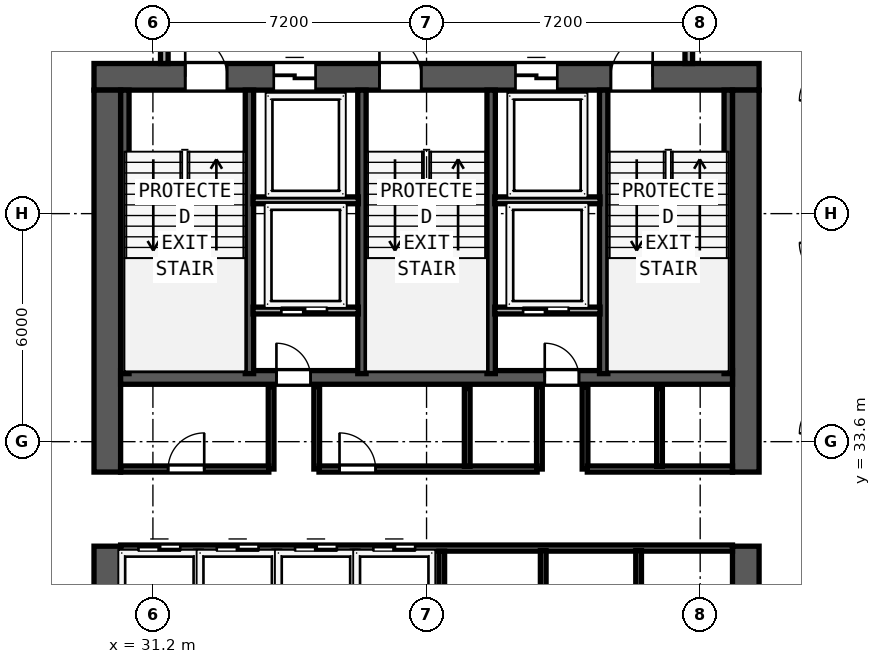
"""IFC4 building model, lengths in metres.
Left out: names, types, materials, properties, quantities, classifications, styles, units other than length and angle.
Written with IfcOpenShell. Run it as: python <this file> out.ifc"""

import sys

from ifc_helpers import new_model, si_unit, direction, frame, frame_2d, origin, place, context, subcontext, project, spatial, rectangle, extrude, element, fill, save


model = new_model("IFC4")
c1 = context("Model", 3, precision=1e-05, world=origin(), true_north=direction((0.0, 1.0)))
c2 = subcontext(c1, "Body", "Model", "MODEL_VIEW")
j1 = project(units=[si_unit("LENGTHUNIT", "METRE"), si_unit("PLANEANGLEUNIT", "RADIAN")], contexts=[c1])
p1 = place(None, origin())
s1 = spatial("IfcSite", under=j1, at=p1, CompositionType="ELEMENT")
p2 = place(p1, origin())
s2 = spatial("IfcBuilding", under=s1, at=p2, CompositionType="ELEMENT")
p3 = place(p2, frame((0.0, 0.0, 152.4)))
s3 = spatial("IfcBuildingStorey", under=s2, at=p3, CompositionType="ELEMENT", Elevation=152.4)
p4 = place(p3, frame((29.65, 43.2, 0.0), z_axis=(0.0, 0.0, 1.0), x_axis=(1.0, 0.0, 0.0)))
e1 = element("IfcWall", 1, at=p4, inside=s3, PredefinedType="SHEAR", context=c2, shape_type="SweptSolid", body=[
    extrude(rectangle(XDim=17.5, YDim=0.7, at=frame_2d((8.75, 0.0))), origin(), (0.0, 0.0, 1.0), 3.6),
])
p5 = place(p4, frame((2.4, 0.0, 0.0)))
e2 = element("IfcOpeningElement", 2, at=p5, cuts=e1, PredefinedType="OPENING", context=c2, shape_type="SweptSolid", body=[
    extrude(rectangle(XDim=1.1, YDim=2.15, at=frame_2d((0.55, 1.075))), frame((0.0, 0.36, 0.0), z_axis=(0.0, -1.0, 0.0), x_axis=(1.0, 0.0, 0.0)), (0.0, 0.0, 1.0), 0.72),
])
p6 = place(p4, frame((7.51, 0.0, 0.0)))
e3 = element("IfcOpeningElement", 3, at=p6, cuts=e1, PredefinedType="OPENING", context=c2, shape_type="SweptSolid", body=[
    extrude(rectangle(XDim=1.1, YDim=2.15, at=frame_2d((0.55, 1.075))), frame((0.0, 0.36, 0.0), z_axis=(0.0, -1.0, 0.0), x_axis=(1.0, 0.0, 0.0)), (0.0, 0.0, 1.0), 0.72),
])
p7 = place(p4, frame((13.6, 0.0, 0.0)))
e4 = element("IfcOpeningElement", 4, at=p7, cuts=e1, PredefinedType="OPENING", context=c2, shape_type="SweptSolid", body=[
    extrude(rectangle(XDim=1.1, YDim=2.15, at=frame_2d((0.55, 1.075))), frame((0.0, 0.36, 0.0), z_axis=(0.0, -1.0, 0.0), x_axis=(1.0, 0.0, 0.0)), (0.0, 0.0, 1.0), 0.72),
])
p8 = place(p4, frame((4.73, 0.0, 0.0)))
e5 = element("IfcOpeningElement", 5, at=p8, cuts=e1, PredefinedType="OPENING", context=c2, shape_type="SweptSolid", body=[
    extrude(rectangle(XDim=1.1, YDim=2.2, at=frame_2d((0.55, 1.1))), frame((0.0, 0.36, 0.0), z_axis=(0.0, -1.0, 0.0), x_axis=(1.0, 0.0, 0.0)), (0.0, 0.0, 1.0), 0.72),
])
p9 = place(p4, frame((11.09, 0.0, 0.0)))
e6 = element("IfcOpeningElement", 6, at=p9, cuts=e1, PredefinedType="OPENING", context=c2, shape_type="SweptSolid", body=[
    extrude(rectangle(XDim=1.1, YDim=2.2, at=frame_2d((0.55, 1.1))), frame((0.0, 0.36, 0.0), z_axis=(0.0, -1.0, 0.0), x_axis=(1.0, 0.0, 0.0)), (0.0, 0.0, 1.0), 0.72),
])
p10 = place(p3, frame((30.0, 26.75, 0.0), z_axis=(0.0, 0.0, 1.0), x_axis=(0.0, 1.0, 0.0)))
e7 = element("IfcWall", 7, at=p10, inside=s3, PredefinedType="SHEAR", context=c2, shape_type="SweptSolid", body=[
    extrude(rectangle(XDim=4.1, YDim=0.7, at=frame_2d((2.05, 0.0))), origin(), (0.0, 0.0, 1.0), 3.6),
])
p11 = place(p3, frame((30.0, 32.8, 0.0), z_axis=(0.0, 0.0, 1.0), x_axis=(0.0, 1.0, 0.0)))
e8 = element("IfcWall", 8, at=p11, inside=s3, PredefinedType="SHEAR", context=c2, shape_type="SweptSolid", body=[
    extrude(rectangle(XDim=10.05, YDim=0.7, at=frame_2d((5.025, 0.0))), origin(), (0.0, 0.0, 1.0), 3.6),
])
p12 = place(p3, frame((46.8, 26.75, 0.0), z_axis=(0.0, 0.0, 1.0), x_axis=(0.0, 1.0, 0.0)))
e9 = element("IfcWall", 9, at=p12, inside=s3, PredefinedType="SHEAR", context=c2, shape_type="SweptSolid", body=[
    extrude(rectangle(XDim=4.1, YDim=0.7, at=frame_2d((2.05, 0.0))), origin(), (0.0, 0.0, 1.0), 3.6),
])
p13 = place(p3, frame((46.8, 32.8, 0.0), z_axis=(0.0, 0.0, 1.0), x_axis=(0.0, 1.0, 0.0)))
e10 = element("IfcWall", 10, at=p13, inside=s3, PredefinedType="SHEAR", context=c2, shape_type="SweptSolid", body=[
    extrude(rectangle(XDim=10.05, YDim=0.7, at=frame_2d((5.025, 0.0))), origin(), (0.0, 0.0, 1.0), 3.6),
])
p14 = place(p3, frame((30.35, 35.29, 0.0), z_axis=(0.0, 0.0, 1.0), x_axis=(1.0, 0.0, 0.0)))
e11 = element("IfcWall", 11, at=p14, inside=s3, PredefinedType="SHEAR", context=c2, shape_type="SweptSolid", body=[
    extrude(rectangle(XDim=16.1, YDim=0.36, at=frame_2d((8.05, 0.0))), origin(), (0.0, 0.0, 1.0), 3.6),
])
p15 = place(p14, frame((5.0, 0.0, 0.0), z_axis=(0.0, 0.0, 1.0), x_axis=(-1.0, 0.0, 0.0)))
e12 = element("IfcOpeningElement", 12, at=p15, cuts=e11, PredefinedType="OPENING", context=c2, shape_type="SweptSolid", body=[
    extrude(rectangle(XDim=0.9, YDim=2.1, at=frame_2d((0.45, 1.05))), frame((0.0, 0.19, 0.0), z_axis=(0.0, -1.0, 0.0), x_axis=(1.0, 0.0, 0.0)), (0.0, 0.0, 1.0), 0.38),
])
p16 = place(p14, frame((12.06, 0.0, 0.0), z_axis=(0.0, 0.0, 1.0), x_axis=(-1.0, 0.0, 0.0)))
e13 = element("IfcOpeningElement", 13, at=p16, cuts=e11, PredefinedType="OPENING", context=c2, shape_type="SweptSolid", body=[
    extrude(rectangle(XDim=0.9, YDim=2.1, at=frame_2d((0.45, 1.05))), frame((0.0, 0.19, 0.0), z_axis=(0.0, -1.0, 0.0), x_axis=(1.0, 0.0, 0.0)), (0.0, 0.0, 1.0), 0.38),
])
for number, where, z_axis, x_axis in (
    (14, (30.462, 35.39, 0.0), (0.0, 0.0, 1.0), (0.0, 1.0, 0.0)),
    (15, (33.74, 35.39, 0.0), (0.0, 0.0, 1.0), (0.0, 1.0, 0.0)),
    (16, (36.7, 35.39, 0.0), (0.0, 0.0, 1.0), (0.0, 1.0, 0.0)),
    (17, (40.1, 35.39, 0.0), (0.0, 0.0, 1.0), (0.0, 1.0, 0.0)),
    (18, (43.06, 35.39, 0.0), (0.0, 0.0, 1.0), (0.0, 1.0, 0.0)),
    (19, (46.338, 35.39, 0.0), (0.0, 0.0, 1.0), (0.0, 1.0, 0.0)),
):
    element("IfcWall", number, at=place(p3, frame(where, z_axis=z_axis, x_axis=x_axis)), inside=s3, PredefinedType="SHEAR", context=c2, shape_type="SweptSolid", body=[
        extrude(rectangle(XDim=7.46, YDim=0.22, at=frame_2d((3.73, 0.0))), origin(), (0.0, 0.0, 1.0), 3.6),
    ])
p17 = place(p3, frame((31.5, 43.55, 0.0), z_axis=(0.0, 0.0, 1.0), x_axis=(0.0, 1.0, 0.0)))
e20 = element("IfcWall", 20, at=p17, inside=s3, PredefinedType="SOLIDWALL", context=c2, shape_type="SweptSolid", body=[
    extrude(rectangle(XDim=2.885, YDim=0.2, at=frame_2d((1.442, 0.0))), origin(), (0.0, 0.0, 1.0), 3.6),
])
p18 = place(p17, frame((1.8, 0.0, 0.0), z_axis=(0.0, 0.0, 1.0), x_axis=(-1.0, 0.0, 0.0)))
e21 = element("IfcOpeningElement", 21, at=p18, cuts=e20, PredefinedType="OPENING", context=c2, shape_type="SweptSolid", body=[
    extrude(rectangle(XDim=1.1, YDim=2.15, at=frame_2d((0.55, 1.075))), frame((0.0, 0.11, 0.0), z_axis=(0.0, -1.0, 0.0), x_axis=(1.0, 0.0, 0.0)), (0.0, 0.0, 1.0), 0.22),
])
p19 = place(p3, frame((45.3, 43.55, 0.0), z_axis=(0.0, 0.0, 1.0), x_axis=(0.0, 1.0, 0.0)))
e22 = element("IfcWall", 22, at=p19, inside=s3, PredefinedType="SOLIDWALL", context=c2, shape_type="SweptSolid", body=[
    extrude(rectangle(XDim=2.885, YDim=0.2, at=frame_2d((1.442, 0.0))), origin(), (0.0, 0.0, 1.0), 3.6),
])
p20 = place(p19, frame((0.7, 0.0, 0.0)))
e23 = element("IfcOpeningElement", 23, at=p20, cuts=e22, PredefinedType="OPENING", context=c2, shape_type="SweptSolid", body=[
    extrude(rectangle(XDim=1.1, YDim=2.15, at=frame_2d((0.55, 1.075))), frame((0.0, 0.11, 0.0), z_axis=(0.0, -1.0, 0.0), x_axis=(1.0, 0.0, 0.0)), (0.0, 0.0, 1.0), 0.22),
])
for number, where, z_axis, x_axis in (
    (24, (33.835, 39.95, 0.0), (0.0, 0.0, 1.0), (1.0, 0.0, 0.0)),
    (25, (40.195, 39.95, 0.0), (0.0, 0.0, 1.0), (1.0, 0.0, 0.0)),
):
    element("IfcWall", number, at=place(p3, frame(where, z_axis=z_axis, x_axis=x_axis)), inside=s3, PredefinedType="SOLIDWALL", context=c2, shape_type="SweptSolid", body=[
        extrude(rectangle(XDim=2.77, YDim=0.18, at=frame_2d((1.385, 0.0))), origin(), (0.0, 0.0, 1.0), 3.6),
    ])
p21 = place(p3, frame((33.835, 37.05, 0.0), z_axis=(0.0, 0.0, 1.0), x_axis=(1.0, 0.0, 0.0)))
e26 = element("IfcWall", 26, at=p21, inside=s3, PredefinedType="SOLIDWALL", context=c2, shape_type="SweptSolid", body=[
    extrude(rectangle(XDim=2.77, YDim=0.18, at=frame_2d((1.385, 0.0))), origin(), (0.0, 0.0, 1.0), 3.6),
])
p22 = place(p21, frame((1.945, 0.0, 0.0), z_axis=(0.0, 0.0, 1.0), x_axis=(-1.0, 0.0, 0.0)))
e27 = element("IfcOpeningElement", 27, at=p22, cuts=e26, PredefinedType="OPENING", context=c2, shape_type="SweptSolid", body=[
    extrude(rectangle(XDim=1.2, YDim=2.2, at=frame_2d((0.6, 1.1))), frame((0.0, 0.1, 0.0), z_axis=(0.0, -1.0, 0.0), x_axis=(1.0, 0.0, 0.0)), (0.0, 0.0, 1.0), 0.2),
])
for number, where, z_axis, x_axis in (
    (28, (34.31, 32.88, 0.0), (0.0, 0.0, 1.0), (0.0, 1.0, 0.0)),
    (29, (35.51, 32.88, 0.0), (0.0, 0.0, 1.0), (0.0, 1.0, 0.0)),
):
    element("IfcWall", number, at=place(p3, frame(where, z_axis=z_axis, x_axis=x_axis)), inside=s3, PredefinedType="SOLIDWALL", context=c2, shape_type="SweptSolid", body=[
        extrude(rectangle(XDim=2.17, YDim=0.15, at=frame_2d((1.085, 0.0))), origin(), (0.0, 0.0, 1.0), 3.6),
    ])
p23 = place(p3, frame((40.195, 37.05, 0.0), z_axis=(0.0, 0.0, 1.0), x_axis=(1.0, 0.0, 0.0)))
e30 = element("IfcWall", 30, at=p23, inside=s3, PredefinedType="SOLIDWALL", context=c2, shape_type="SweptSolid", body=[
    extrude(rectangle(XDim=2.77, YDim=0.18, at=frame_2d((1.385, 0.0))), origin(), (0.0, 0.0, 1.0), 3.6),
])
p24 = place(p23, frame((1.945, 0.0, 0.0), z_axis=(0.0, 0.0, 1.0), x_axis=(-1.0, 0.0, 0.0)))
e31 = element("IfcOpeningElement", 31, at=p24, cuts=e30, PredefinedType="OPENING", context=c2, shape_type="SweptSolid", body=[
    extrude(rectangle(XDim=1.2, YDim=2.2, at=frame_2d((0.6, 1.1))), frame((0.0, 0.1, 0.0), z_axis=(0.0, -1.0, 0.0), x_axis=(1.0, 0.0, 0.0)), (0.0, 0.0, 1.0), 0.2),
])
for number, where, z_axis, x_axis in (
    (32, (41.37, 32.88, 0.0), (0.0, 0.0, 1.0), (0.0, 1.0, 0.0)),
    (33, (42.57, 32.88, 0.0), (0.0, 0.0, 1.0), (0.0, 1.0, 0.0)),
):
    element("IfcWall", number, at=place(p3, frame(where, z_axis=z_axis, x_axis=x_axis)), inside=s3, PredefinedType="SOLIDWALL", context=c2, shape_type="SweptSolid", body=[
        extrude(rectangle(XDim=2.17, YDim=0.15, at=frame_2d((1.085, 0.0))), origin(), (0.0, 0.0, 1.0), 3.6),
    ])
p25 = place(p3, frame((30.35, 32.88, 0.0), z_axis=(0.0, 0.0, 1.0), x_axis=(1.0, 0.0, 0.0)))
e34 = element("IfcWall", 34, at=p25, inside=s3, PredefinedType="SOLIDWALL", context=c2, shape_type="SweptSolid", body=[
    extrude(rectangle(XDim=3.9, YDim=0.16, at=frame_2d((1.95, 0.0))), origin(), (0.0, 0.0, 1.0), 3.6),
])
p26 = place(p25, frame((2.2, 0.0, 0.0), z_axis=(0.0, 0.0, 1.0), x_axis=(-1.0, 0.0, 0.0)))
e35 = element("IfcOpeningElement", 35, at=p26, cuts=e34, PredefinedType="OPENING", context=c2, shape_type="SweptSolid", body=[
    extrude(rectangle(XDim=0.95, YDim=2.12, at=frame_2d((0.475, 1.06))), frame((0.0, 0.09, 0.0), z_axis=(0.0, -1.0, 0.0), x_axis=(1.0, 0.0, 0.0)), (0.0, 0.0, 1.0), 0.18),
])
p27 = place(p3, frame((35.57, 32.88, 0.0), z_axis=(0.0, 0.0, 1.0), x_axis=(1.0, 0.0, 0.0)))
e36 = element("IfcWall", 36, at=p27, inside=s3, PredefinedType="SOLIDWALL", context=c2, shape_type="SweptSolid", body=[
    extrude(rectangle(XDim=5.74, YDim=0.16, at=frame_2d((2.87, 0.0))), origin(), (0.0, 0.0, 1.0), 3.6),
])
p28 = place(p27, frame((1.49, 0.0, 0.0), z_axis=(0.0, 0.0, 1.0), x_axis=(-1.0, 0.0, 0.0)))
e37 = element("IfcOpeningElement", 37, at=p28, cuts=e36, PredefinedType="OPENING", context=c2, shape_type="SweptSolid", body=[
    extrude(rectangle(XDim=0.95, YDim=2.12, at=frame_2d((0.475, 1.06))), frame((0.0, 0.09, 0.0), z_axis=(0.0, -1.0, 0.0), x_axis=(1.0, 0.0, 0.0)), (0.0, 0.0, 1.0), 0.18),
])
p29 = place(p3, frame((42.63, 32.88, 0.0), z_axis=(0.0, 0.0, 1.0), x_axis=(1.0, 0.0, 0.0)))
e38 = element("IfcWall", 38, at=p29, inside=s3, PredefinedType="SOLIDWALL", context=c2, shape_type="SweptSolid", body=[
    extrude(rectangle(XDim=3.82, YDim=0.16, at=frame_2d((1.91, 0.0))), origin(), (0.0, 0.0, 1.0), 3.6),
])
for number, where, z_axis, x_axis in (
    (39, (39.47, 32.95, 0.0), (0.0, 0.0, 1.0), (0.0, 1.0, 0.0)),
    (40, (44.53, 32.95, 0.0), (0.0, 0.0, 1.0), (0.0, 1.0, 0.0)),
):
    element("IfcWall", number, at=place(p3, frame(where, z_axis=z_axis, x_axis=x_axis)), inside=s3, PredefinedType="SOLIDWALL", context=c2, shape_type="SweptSolid", body=[
        extrude(rectangle(XDim=2.05, YDim=0.15, at=frame_2d((1.025, 0.0))), origin(), (0.0, 0.0, 1.0), 3.6),
    ])
p30 = place(p3, frame((30.35, 30.8, 0.0), z_axis=(0.0, 0.0, 1.0), x_axis=(1.0, 0.0, 0.0)))
e41 = element("IfcWall", 41, at=p30, inside=s3, PredefinedType="SOLIDWALL", context=c2, shape_type="SweptSolid", body=[
    extrude(rectangle(XDim=16.1, YDim=0.16, at=frame_2d((8.05, 0.0))), origin(), (0.0, 0.0, 1.0), 3.6),
])
p31 = place(p30, frame((0.47, 0.0, 0.0)))
e42 = element("IfcOpeningElement", 42, at=p31, cuts=e41, PredefinedType="OPENING", context=c2, shape_type="SweptSolid", body=[
    extrude(rectangle(XDim=1.1, YDim=2.2, at=frame_2d((0.55, 1.1))), frame((0.0, 0.09, 0.0), z_axis=(0.0, -1.0, 0.0), x_axis=(1.0, 0.0, 0.0)), (0.0, 0.0, 1.0), 0.18),
])
p32 = place(p30, frame((2.53, 0.0, 0.0)))
e43 = element("IfcOpeningElement", 43, at=p32, cuts=e41, PredefinedType="OPENING", context=c2, shape_type="SweptSolid", body=[
    extrude(rectangle(XDim=1.1, YDim=2.2, at=frame_2d((0.55, 1.1))), frame((0.0, 0.09, 0.0), z_axis=(0.0, -1.0, 0.0), x_axis=(1.0, 0.0, 0.0)), (0.0, 0.0, 1.0), 0.18),
])
p33 = place(p30, frame((4.59, 0.0, 0.0)))
e44 = element("IfcOpeningElement", 44, at=p33, cuts=e41, PredefinedType="OPENING", context=c2, shape_type="SweptSolid", body=[
    extrude(rectangle(XDim=1.1, YDim=2.2, at=frame_2d((0.55, 1.1))), frame((0.0, 0.09, 0.0), z_axis=(0.0, -1.0, 0.0), x_axis=(1.0, 0.0, 0.0)), (0.0, 0.0, 1.0), 0.18),
])
p34 = place(p30, frame((6.65, 0.0, 0.0)))
e45 = element("IfcOpeningElement", 45, at=p34, cuts=e41, PredefinedType="OPENING", context=c2, shape_type="SweptSolid", body=[
    extrude(rectangle(XDim=1.1, YDim=2.2, at=frame_2d((0.55, 1.1))), frame((0.0, 0.09, 0.0), z_axis=(0.0, -1.0, 0.0), x_axis=(1.0, 0.0, 0.0)), (0.0, 0.0, 1.0), 0.18),
])
for number, where, z_axis, x_axis in (
    (46, (32.4, 28.735, 0.0), (0.0, 0.0, 1.0), (0.0, 1.0, 0.0)),
    (47, (34.46, 28.735, 0.0), (0.0, 0.0, 1.0), (0.0, 1.0, 0.0)),
    (48, (36.52, 28.735, 0.0), (0.0, 0.0, 1.0), (0.0, 1.0, 0.0)),
    (49, (38.8, 28.735, 0.0), (0.0, 0.0, 1.0), (0.0, 1.0, 0.0)),
):
    element("IfcWall", number, at=place(p3, frame(where, z_axis=z_axis, x_axis=x_axis)), inside=s3, PredefinedType="SOLIDWALL", context=c2, shape_type="SweptSolid", body=[
        extrude(rectangle(XDim=1.985, YDim=0.15, at=frame_2d((0.992, 0.0))), origin(), (0.0, 0.0, 1.0), 3.6),
    ])
for number, where, z_axis, x_axis in (
    (50, (41.47, 28.75, 0.0), (0.0, 0.0, 1.0), (0.0, 1.0, 0.0)),
    (51, (43.98, 28.75, 0.0), (0.0, 0.0, 1.0), (0.0, 1.0, 0.0)),
):
    element("IfcWall", number, at=place(p3, frame(where, z_axis=z_axis, x_axis=x_axis)), inside=s3, PredefinedType="SOLIDWALL", context=c2, shape_type="SweptSolid", body=[
        extrude(rectangle(XDim=1.985, YDim=0.15, at=frame_2d((0.993, 0.0))), origin(), (0.0, 0.0, 1.0), 3.6),
    ])
p35 = place(p5, origin())
e52 = element("IfcDoor", 52, at=p35, inside=s3, OperationType="SINGLE_SWING_LEFT", PredefinedType="DOOR", context=c2, shape_type="SweptSolid", body=[
    extrude(rectangle(XDim=1.1, YDim=2.15, at=frame_2d((0.55, 1.075))), frame((0.0, 0.185, 0.0), z_axis=(0.0, -1.0, 0.0), x_axis=(1.0, 0.0, 0.0)), (0.0, 0.0, 1.0), 0.05),
])
fill(e2, e52)
p36 = place(p6, origin())
e53 = element("IfcDoor", 53, at=p36, inside=s3, OperationType="SINGLE_SWING_LEFT", PredefinedType="DOOR", context=c2, shape_type="SweptSolid", body=[
    extrude(rectangle(XDim=1.1, YDim=2.15, at=frame_2d((0.55, 1.075))), frame((0.0, 0.185, 0.0), z_axis=(0.0, -1.0, 0.0), x_axis=(1.0, 0.0, 0.0)), (0.0, 0.0, 1.0), 0.05),
])
fill(e3, e53)
p37 = place(p7, origin())
e54 = element("IfcDoor", 54, at=p37, inside=s3, OperationType="SINGLE_SWING_RIGHT", PredefinedType="DOOR", context=c2, shape_type="SweptSolid", body=[
    extrude(rectangle(XDim=1.1, YDim=2.15, at=frame_2d((0.55, 1.075))), frame((0.0, 0.185, 0.0), z_axis=(0.0, -1.0, 0.0), x_axis=(1.0, 0.0, 0.0)), (0.0, 0.0, 1.0), 0.05),
])
fill(e4, e54)
p38 = place(p8, origin())
e55 = element("IfcDoor", 55, at=p38, inside=s3, OperationType="SLIDING_TO_LEFT", PredefinedType="DOOR", context=c2, shape_type="SweptSolid", body=[
    extrude(rectangle(XDim=1.1, YDim=2.2, at=frame_2d((0.55, 1.1))), frame((0.0, 0.185, 0.0), z_axis=(0.0, -1.0, 0.0), x_axis=(1.0, 0.0, 0.0)), (0.0, 0.0, 1.0), 0.05),
])
fill(e5, e55)
p39 = place(p9, origin())
e56 = element("IfcDoor", 56, at=p39, inside=s3, OperationType="SLIDING_TO_LEFT", PredefinedType="DOOR", context=c2, shape_type="SweptSolid", body=[
    extrude(rectangle(XDim=1.1, YDim=2.2, at=frame_2d((0.55, 1.1))), frame((0.0, 0.185, 0.0), z_axis=(0.0, -1.0, 0.0), x_axis=(1.0, 0.0, 0.0)), (0.0, 0.0, 1.0), 0.05),
])
fill(e6, e56)
p40 = place(p22, origin())
e57 = element("IfcDoor", 57, at=p40, inside=s3, OperationType="SLIDING_TO_RIGHT", PredefinedType="DOOR", context=c2, shape_type="SweptSolid", body=[
    extrude(rectangle(XDim=1.2, YDim=2.2, at=frame_2d((0.6, 1.1))), frame((0.0, 0.025, 0.0), z_axis=(0.0, -1.0, 0.0), x_axis=(1.0, 0.0, 0.0)), (0.0, 0.0, 1.0), 0.05),
])
fill(e27, e57)
p41 = place(p15, origin())
e58 = element("IfcDoor", 58, at=p41, inside=s3, OperationType="SINGLE_SWING_RIGHT", PredefinedType="DOOR", context=c2, shape_type="SweptSolid", body=[
    extrude(rectangle(XDim=0.9, YDim=2.1, at=frame_2d((0.45, 1.05))), frame((0.0, 0.025, 0.0), z_axis=(0.0, -1.0, 0.0), x_axis=(1.0, 0.0, 0.0)), (0.0, 0.0, 1.0), 0.05),
])
fill(e12, e58)
p42 = place(p24, origin())
e59 = element("IfcDoor", 59, at=p42, inside=s3, OperationType="SLIDING_TO_RIGHT", PredefinedType="DOOR", context=c2, shape_type="SweptSolid", body=[
    extrude(rectangle(XDim=1.2, YDim=2.2, at=frame_2d((0.6, 1.1))), frame((0.0, 0.025, 0.0), z_axis=(0.0, -1.0, 0.0), x_axis=(1.0, 0.0, 0.0)), (0.0, 0.0, 1.0), 0.05),
])
fill(e31, e59)
p43 = place(p16, origin())
e60 = element("IfcDoor", 60, at=p43, inside=s3, OperationType="SINGLE_SWING_RIGHT", PredefinedType="DOOR", context=c2, shape_type="SweptSolid", body=[
    extrude(rectangle(XDim=0.9, YDim=2.1, at=frame_2d((0.45, 1.05))), frame((0.0, 0.025, 0.0), z_axis=(0.0, -1.0, 0.0), x_axis=(1.0, 0.0, 0.0)), (0.0, 0.0, 1.0), 0.05),
])
fill(e13, e60)
p44 = place(p26, origin())
e61 = element("IfcDoor", 61, at=p44, inside=s3, OperationType="SINGLE_SWING_LEFT", PredefinedType="DOOR", context=c2, shape_type="SweptSolid", body=[
    extrude(rectangle(XDim=0.95, YDim=2.12, at=frame_2d((0.475, 1.06))), frame((0.0, 0.025, 0.0), z_axis=(0.0, -1.0, 0.0), x_axis=(1.0, 0.0, 0.0)), (0.0, 0.0, 1.0), 0.05),
])
fill(e35, e61)
p45 = place(p28, origin())
e62 = element("IfcDoor", 62, at=p45, inside=s3, OperationType="SINGLE_SWING_RIGHT", PredefinedType="DOOR", context=c2, shape_type="SweptSolid", body=[
    extrude(rectangle(XDim=0.95, YDim=2.12, at=frame_2d((0.475, 1.06))), frame((0.0, 0.025, 0.0), z_axis=(0.0, -1.0, 0.0), x_axis=(1.0, 0.0, 0.0)), (0.0, 0.0, 1.0), 0.05),
])
fill(e37, e62)
p46 = place(p31, origin())
e63 = element("IfcDoor", 63, at=p46, inside=s3, OperationType="SLIDING_TO_LEFT", PredefinedType="DOOR", context=c2, shape_type="SweptSolid", body=[
    extrude(rectangle(XDim=1.1, YDim=2.2, at=frame_2d((0.55, 1.1))), frame((0.0, 0.025, 0.0), z_axis=(0.0, -1.0, 0.0), x_axis=(1.0, 0.0, 0.0)), (0.0, 0.0, 1.0), 0.05),
])
fill(e42, e63)
p47 = place(p32, origin())
e64 = element("IfcDoor", 64, at=p47, inside=s3, OperationType="SLIDING_TO_LEFT", PredefinedType="DOOR", context=c2, shape_type="SweptSolid", body=[
    extrude(rectangle(XDim=1.1, YDim=2.2, at=frame_2d((0.55, 1.1))), frame((0.0, 0.025, 0.0), z_axis=(0.0, -1.0, 0.0), x_axis=(1.0, 0.0, 0.0)), (0.0, 0.0, 1.0), 0.05),
])
fill(e43, e64)
p48 = place(p33, origin())
e65 = element("IfcDoor", 65, at=p48, inside=s3, OperationType="SLIDING_TO_LEFT", PredefinedType="DOOR", context=c2, shape_type="SweptSolid", body=[
    extrude(rectangle(XDim=1.1, YDim=2.2, at=frame_2d((0.55, 1.1))), frame((0.0, 0.025, 0.0), z_axis=(0.0, -1.0, 0.0), x_axis=(1.0, 0.0, 0.0)), (0.0, 0.0, 1.0), 0.05),
])
fill(e44, e65)
p49 = place(p34, origin())
e66 = element("IfcDoor", 66, at=p49, inside=s3, OperationType="SLIDING_TO_LEFT", PredefinedType="DOOR", context=c2, shape_type="SweptSolid", body=[
    extrude(rectangle(XDim=1.1, YDim=2.2, at=frame_2d((0.55, 1.1))), frame((0.0, 0.025, 0.0), z_axis=(0.0, -1.0, 0.0), x_axis=(1.0, 0.0, 0.0)), (0.0, 0.0, 1.0), 0.05),
])
fill(e45, e66)
save(model, sys.argv[1])
